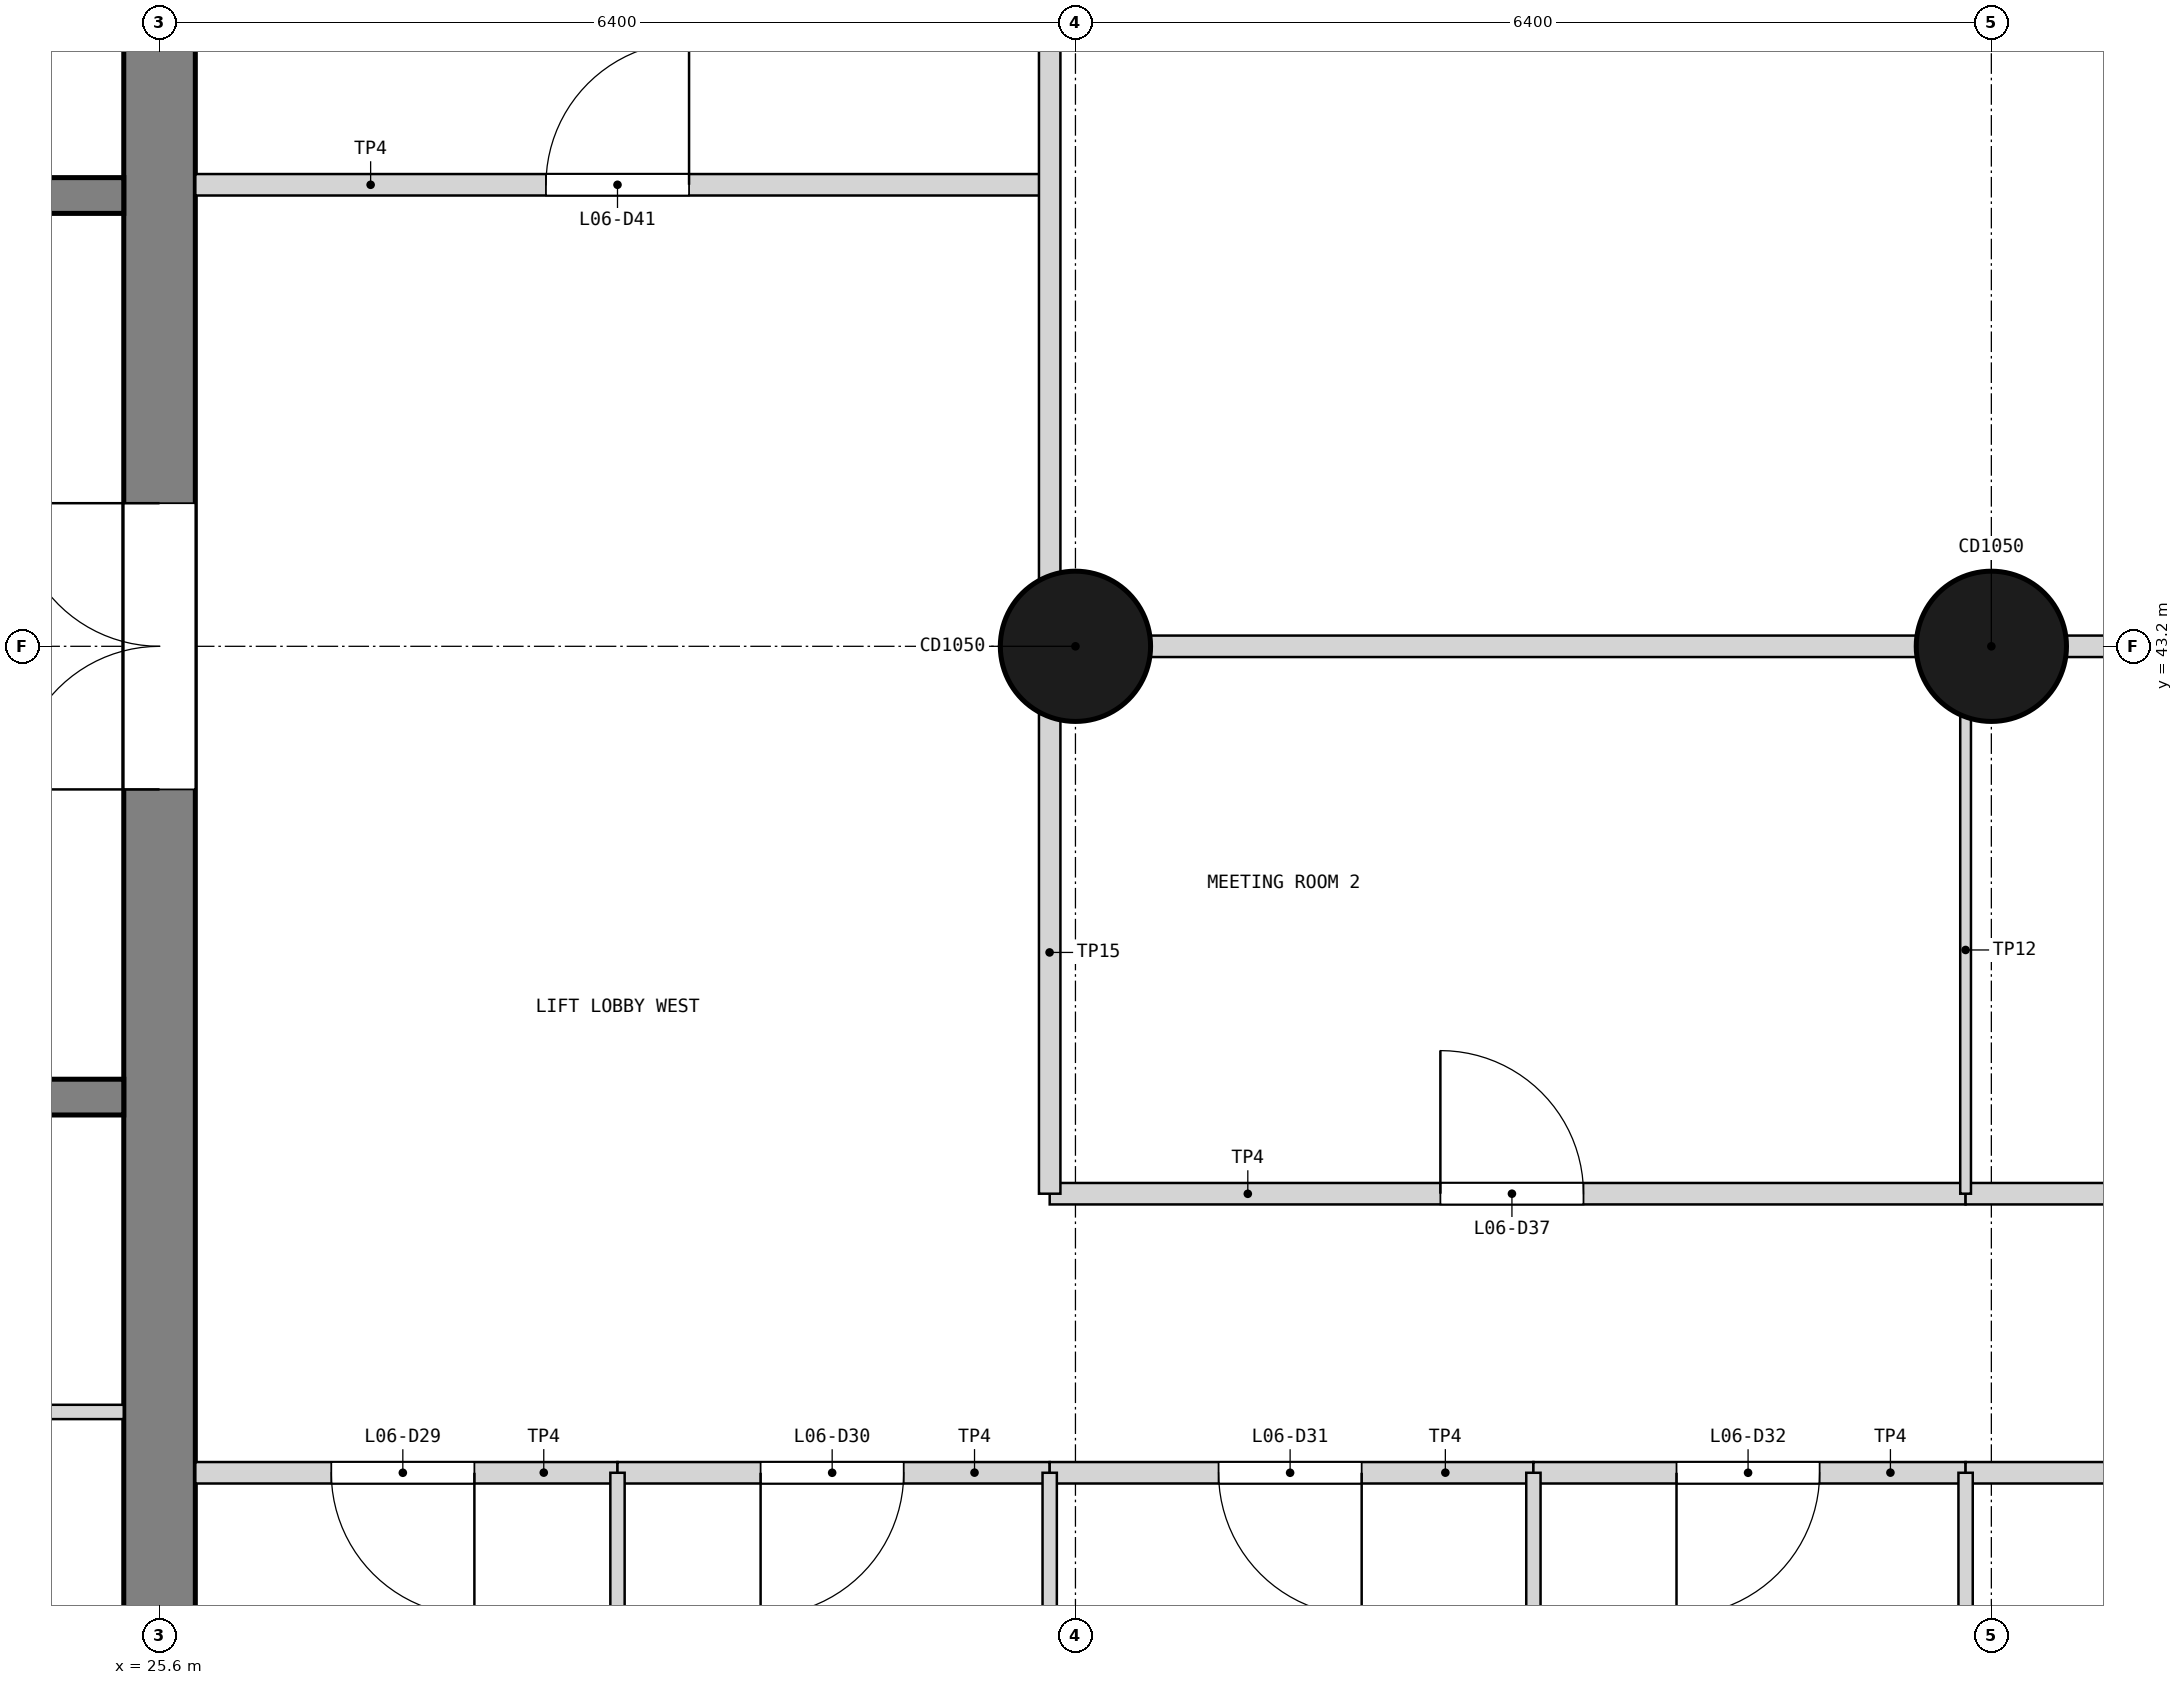
"""IFC4 building model, lengths in metres.
Left out: names, types, materials, properties, quantities, classifications, styles, units other than length and angle.
Written with IfcOpenShell. Run it as: python <this file> out.ifc"""

import sys

from ifc_helpers import new_model, si_unit, direction, frame, frame_2d, origin, origin_2d, place, context, subcontext, project, spatial, rectangle, circle, extrude, element, fill, save


model = new_model("IFC4")
c1 = context("Model", 3, precision=1e-05, world=origin(), true_north=direction((0.0, 1.0)))
c2 = subcontext(c1, "Body", "Model", "MODEL_VIEW")
j1 = project(units=[si_unit("LENGTHUNIT", "METRE"), si_unit("PLANEANGLEUNIT", "RADIAN")], contexts=[c1])
p1 = place(None, origin())
s1 = spatial("IfcSite", under=j1, at=p1, CompositionType="ELEMENT")
p2 = place(p1, origin())
s2 = spatial("IfcBuilding", under=s1, at=p2, CompositionType="ELEMENT")
p3 = place(p2, frame((0.0, 0.0, 24.9)))
s3 = spatial("IfcBuildingStorey", under=s2, at=p3, CompositionType="ELEMENT", Elevation=24.9)
p4 = place(p3, frame((25.6, 33.85, 0.0), z_axis=(0.0, 0.0, 1.0), x_axis=(0.0, 1.0, 0.0)))
e1 = element("IfcWall", 1, at=p4, inside=s3, PredefinedType="SHEAR", context=c2, shape_type="SweptSolid", body=[
    extrude(rectangle(XDim=18.7, YDim=0.5, at=frame_2d((9.35, 0.0))), origin(), (0.0, 0.0, 1.0), 3.9),
])
p5 = place(p4, frame((8.35, 0.0, 0.0)))
e2 = element("IfcOpeningElement", 2, at=p5, cuts=e1, PredefinedType="OPENING", context=c2, shape_type="SweptSolid", body=[
    extrude(rectangle(XDim=2.0, YDim=2.1, at=frame_2d((1.0, 1.05))), frame((0.0, 0.26, 0.0), z_axis=(0.0, -1.0, 0.0), x_axis=(1.0, 0.0, 0.0)), (0.0, 0.0, 1.0), 0.52),
])
for number, where, z_axis, x_axis in (
    (3, (32.0, 43.2, 0.0), (0.0, 0.0, 1.0), (1.0, 0.0, 0.0)),
    (4, (38.4, 43.2, 0.0), (0.0, 0.0, 1.0), (1.0, 0.0, 0.0)),
):
    element("IfcColumn", number, at=place(p3, frame(where, z_axis=z_axis, x_axis=x_axis)), inside=s3, PredefinedType="COLUMN", context=c2, shape_type="SweptSolid", body=[
        extrude(circle(Radius=0.525, at=origin_2d()), origin(), (0.0, 0.0, 1.0), 3.9),
    ])
for number, where, z_axis, x_axis in (
    (5, (19.875, 40.05, 0.0), (0.0, 0.0, 1.0), (1.0, 0.0, 0.0)),
    (6, (19.875, 46.35, 0.0), (0.0, 0.0, 1.0), (1.0, 0.0, 0.0)),
):
    element("IfcWall", number, at=place(p3, frame(where, z_axis=z_axis, x_axis=x_axis)), inside=s3, PredefinedType="SOLIDWALL", context=c2, shape_type="SweptSolid", body=[
        extrude(rectangle(XDim=5.475, YDim=0.25, at=frame_2d((2.738, 0.0))), origin(), (0.0, 0.0, 1.0), 3.6),
    ])
p6 = place(p3, frame((21.675, 37.85, 0.0), z_axis=(0.0, 0.0, 1.0), x_axis=(1.0, 0.0, 0.0)))
e7 = element("IfcWall", 7, at=p6, inside=s3, PredefinedType="PARTITIONING", context=c2, shape_type="SweptSolid", body=[
    extrude(rectangle(XDim=3.675, YDim=0.1, at=frame_2d((1.837, 0.0))), origin(), (0.0, 0.0, 1.0), 3.6),
])
p7 = place(p3, frame((25.85, 37.425, 0.0), z_axis=(0.0, 0.0, 1.0), x_axis=(1.0, 0.0, 0.0)))
e8 = element("IfcWall", 8, at=p7, inside=s3, PredefinedType="PARTITIONING", context=c2, shape_type="SweptSolid", body=[
    extrude(rectangle(XDim=2.95, YDim=0.15, at=frame_2d((1.475, 0.0))), origin(), (0.0, 0.0, 1.0), 3.68),
])
p8 = place(p7, frame((0.95, 0.0, 0.0)))
e9 = element("IfcOpeningElement", 9, at=p8, cuts=e8, PredefinedType="OPENING", context=c2, shape_type="SweptSolid", body=[
    extrude(rectangle(XDim=1.0, YDim=2.1, at=frame_2d((0.5, 1.05))), frame((0.0, 0.085, 0.0), z_axis=(0.0, -1.0, 0.0), x_axis=(1.0, 0.0, 0.0)), (0.0, 0.0, 1.0), 0.17),
])
p9 = place(p3, frame((28.8, 37.425, 0.0), z_axis=(0.0, 0.0, 1.0), x_axis=(1.0, 0.0, 0.0)))
e10 = element("IfcWall", 10, at=p9, inside=s3, PredefinedType="PARTITIONING", context=c2, shape_type="SweptSolid", body=[
    extrude(rectangle(XDim=3.02, YDim=0.15, at=frame_2d((1.51, 0.0))), origin(), (0.0, 0.0, 1.0), 3.68),
])
p10 = place(p9, frame((1.0, 0.0, 0.0)))
e11 = element("IfcOpeningElement", 11, at=p10, cuts=e10, PredefinedType="OPENING", context=c2, shape_type="SweptSolid", body=[
    extrude(rectangle(XDim=1.0, YDim=2.1, at=frame_2d((0.5, 1.05))), frame((0.0, 0.085, 0.0), z_axis=(0.0, -1.0, 0.0), x_axis=(1.0, 0.0, 0.0)), (0.0, 0.0, 1.0), 0.17),
])
p11 = place(p3, frame((31.82, 37.425, 0.0), z_axis=(0.0, 0.0, 1.0), x_axis=(1.0, 0.0, 0.0)))
e12 = element("IfcWall", 12, at=p11, inside=s3, PredefinedType="PARTITIONING", context=c2, shape_type="SweptSolid", body=[
    extrude(rectangle(XDim=3.38, YDim=0.15, at=frame_2d((1.69, 0.0))), origin(), (0.0, 0.0, 1.0), 3.68),
])
p12 = place(p11, frame((1.18, 0.0, 0.0)))
e13 = element("IfcOpeningElement", 13, at=p12, cuts=e12, PredefinedType="OPENING", context=c2, shape_type="SweptSolid", body=[
    extrude(rectangle(XDim=1.0, YDim=2.1, at=frame_2d((0.5, 1.05))), frame((0.0, 0.085, 0.0), z_axis=(0.0, -1.0, 0.0), x_axis=(1.0, 0.0, 0.0)), (0.0, 0.0, 1.0), 0.17),
])
p13 = place(p3, frame((35.2, 37.425, 0.0), z_axis=(0.0, 0.0, 1.0), x_axis=(1.0, 0.0, 0.0)))
e14 = element("IfcWall", 14, at=p13, inside=s3, PredefinedType="PARTITIONING", context=c2, shape_type="SweptSolid", body=[
    extrude(rectangle(XDim=3.02, YDim=0.15, at=frame_2d((1.51, 0.0))), origin(), (0.0, 0.0, 1.0), 3.68),
])
p14 = place(p13, frame((1.0, 0.0, 0.0)))
e15 = element("IfcOpeningElement", 15, at=p14, cuts=e14, PredefinedType="OPENING", context=c2, shape_type="SweptSolid", body=[
    extrude(rectangle(XDim=1.0, YDim=2.1, at=frame_2d((0.5, 1.05))), frame((0.0, 0.085, 0.0), z_axis=(0.0, -1.0, 0.0), x_axis=(1.0, 0.0, 0.0)), (0.0, 0.0, 1.0), 0.17),
])
p15 = place(p3, frame((38.22, 37.425, 0.0), z_axis=(0.0, 0.0, 1.0), x_axis=(1.0, 0.0, 0.0)))
e16 = element("IfcWall", 16, at=p15, inside=s3, PredefinedType="PARTITIONING", context=c2, shape_type="SweptSolid", body=[
    extrude(rectangle(XDim=13.16, YDim=0.15, at=frame_2d((6.58, 0.0))), origin(), (0.0, 0.0, 1.0), 3.68),
])
p16 = place(p15, frame((2.43, 0.0, 0.0)))
e17 = element("IfcOpeningElement", 17, at=p16, cuts=e16, PredefinedType="OPENING", context=c2, shape_type="SweptSolid", body=[
    extrude(rectangle(XDim=1.8, YDim=2.1, at=frame_2d((0.9, 1.05))), frame((0.0, 0.085, 0.0), z_axis=(0.0, -1.0, 0.0), x_axis=(1.0, 0.0, 0.0)), (0.0, 0.0, 1.0), 0.17),
])
p17 = place(p15, frame((8.93, 0.0, 0.0)))
e18 = element("IfcOpeningElement", 18, at=p17, cuts=e16, PredefinedType="OPENING", context=c2, shape_type="SweptSolid", body=[
    extrude(rectangle(XDim=1.8, YDim=2.1, at=frame_2d((0.9, 1.05))), frame((0.0, 0.085, 0.0), z_axis=(0.0, -1.0, 0.0), x_axis=(1.0, 0.0, 0.0)), (0.0, 0.0, 1.0), 0.17),
])
p18 = place(p3, frame((28.8, 31.3, 0.0), z_axis=(0.0, 0.0, 1.0), x_axis=(0.0, 1.0, 0.0)))
e19 = element("IfcWall", 19, at=p18, inside=s3, PredefinedType="PARTITIONING", context=c2, shape_type="SweptSolid", body=[
    extrude(rectangle(XDim=6.125, YDim=0.1, at=frame_2d((3.062, 0.0))), origin(), (0.0, 0.0, 1.0), 3.08),
])
p19 = place(p3, frame((31.82, 34.205, 0.0), z_axis=(0.0, 0.0, 1.0), x_axis=(0.0, 1.0, 0.0)))
e20 = element("IfcWall", 20, at=p19, inside=s3, PredefinedType="PARTITIONING", context=c2, shape_type="SweptSolid", body=[
    extrude(rectangle(XDim=3.22, YDim=0.1, at=frame_2d((1.61, 0.0))), origin(), (0.0, 0.0, 1.0), 2.78),
])
p20 = place(p3, frame((35.2, 31.3, 0.0), z_axis=(0.0, 0.0, 1.0), x_axis=(0.0, 1.0, 0.0)))
e21 = element("IfcWall", 21, at=p20, inside=s3, PredefinedType="PARTITIONING", context=c2, shape_type="SweptSolid", body=[
    extrude(rectangle(XDim=6.125, YDim=0.1, at=frame_2d((3.062, 0.0))), origin(), (0.0, 0.0, 1.0), 3.08),
])
p21 = place(p3, frame((38.22, 34.205, 0.0), z_axis=(0.0, 0.0, 1.0), x_axis=(0.0, 1.0, 0.0)))
e22 = element("IfcWall", 22, at=p21, inside=s3, PredefinedType="PARTITIONING", context=c2, shape_type="SweptSolid", body=[
    extrude(rectangle(XDim=3.22, YDim=0.1, at=frame_2d((1.61, 0.0))), origin(), (0.0, 0.0, 1.0), 2.78),
])
p22 = place(p3, frame((31.82, 39.375, 0.0), z_axis=(0.0, 0.0, 1.0), x_axis=(1.0, 0.0, 0.0)))
e23 = element("IfcWall", 23, at=p22, inside=s3, PredefinedType="PARTITIONING", context=c2, shape_type="SweptSolid", body=[
    extrude(rectangle(XDim=6.4, YDim=0.15, at=frame_2d((3.2, 0.0))), origin(), (0.0, 0.0, 1.0), 3.68),
])
p23 = place(p22, frame((2.73, 0.0, 0.0)))
e24 = element("IfcOpeningElement", 24, at=p23, cuts=e23, PredefinedType="OPENING", context=c2, shape_type="SweptSolid", body=[
    extrude(rectangle(XDim=1.0, YDim=2.1, at=frame_2d((0.5, 1.05))), frame((0.0, 0.085, 0.0), z_axis=(0.0, -1.0, 0.0), x_axis=(1.0, 0.0, 0.0)), (0.0, 0.0, 1.0), 0.17),
])
p24 = place(p3, frame((38.22, 39.375, 0.0), z_axis=(0.0, 0.0, 1.0), x_axis=(1.0, 0.0, 0.0)))
e25 = element("IfcWall", 25, at=p24, inside=s3, PredefinedType="PARTITIONING", context=c2, shape_type="SweptSolid", body=[
    extrude(rectangle(XDim=6.4, YDim=0.15, at=frame_2d((3.2, 0.0))), origin(), (0.0, 0.0, 1.0), 3.68),
])
p25 = place(p24, frame((2.68, 0.0, 0.0)))
e26 = element("IfcOpeningElement", 26, at=p25, cuts=e25, PredefinedType="OPENING", context=c2, shape_type="SweptSolid", body=[
    extrude(rectangle(XDim=1.0, YDim=2.1, at=frame_2d((0.5, 1.05))), frame((0.0, 0.085, 0.0), z_axis=(0.0, -1.0, 0.0), x_axis=(1.0, 0.0, 0.0)), (0.0, 0.0, 1.0), 0.17),
])
p26 = place(p3, frame((38.22, 39.375, 0.0), z_axis=(0.0, 0.0, 1.0), x_axis=(0.0, 1.0, 0.0)))
e27 = element("IfcWall", 27, at=p26, inside=s3, PredefinedType="PARTITIONING", context=c2, shape_type="SweptSolid", body=[
    extrude(rectangle(XDim=3.352, YDim=0.075, at=frame_2d((1.676, 0.0))), origin(), (0.0, 0.0, 1.0), 2.78),
])
p27 = place(p3, frame((31.82, 43.2, 0.0), z_axis=(0.0, 0.0, 1.0), x_axis=(1.0, 0.0, 0.0)))
e28 = element("IfcWall", 28, at=p27, inside=s3, PredefinedType="PARTITIONING", context=c2, shape_type="SweptSolid", body=[
    extrude(rectangle(XDim=25.96, YDim=0.15, at=frame_2d((12.98, 0.0))), origin(), (0.0, 0.0, 1.0), 2.88),
])
p28 = place(p27, frame((13.825, 0.0, 0.0)))
e29 = element("IfcOpeningElement", 29, at=p28, cuts=e28, PredefinedType="OPENING", context=c2, shape_type="SweptSolid", body=[
    extrude(rectangle(XDim=1.8, YDim=2.1, at=frame_2d((0.9, 1.05))), frame((0.0, 0.085, 0.0), z_axis=(0.0, -1.0, 0.0), x_axis=(1.0, 0.0, 0.0)), (0.0, 0.0, 1.0), 0.17),
])
p29 = place(p27, frame((16.725, 0.0, 0.0)))
e30 = element("IfcOpeningElement", 30, at=p29, cuts=e28, PredefinedType="OPENING", context=c2, shape_type="SweptSolid", body=[
    extrude(rectangle(XDim=1.8, YDim=2.1, at=frame_2d((0.9, 1.05))), frame((0.0, 0.085, 0.0), z_axis=(0.0, -1.0, 0.0), x_axis=(1.0, 0.0, 0.0)), (0.0, 0.0, 1.0), 0.17),
])
p30 = place(p3, frame((25.85, 46.425, 0.0), z_axis=(0.0, 0.0, 1.0), x_axis=(1.0, 0.0, 0.0)))
e31 = element("IfcWall", 31, at=p30, inside=s3, PredefinedType="PARTITIONING", context=c2, shape_type="SweptSolid", body=[
    extrude(rectangle(XDim=5.97, YDim=0.15, at=frame_2d((2.985, 0.0))), origin(), (0.0, 0.0, 1.0), 3.68),
])
p31 = place(p30, frame((2.45, 0.0, 0.0)))
e32 = element("IfcOpeningElement", 32, at=p31, cuts=e31, PredefinedType="OPENING", context=c2, shape_type="SweptSolid", body=[
    extrude(rectangle(XDim=1.0, YDim=2.1, at=frame_2d((0.5, 1.05))), frame((0.0, 0.085, 0.0), z_axis=(0.0, -1.0, 0.0), x_axis=(1.0, 0.0, 0.0)), (0.0, 0.0, 1.0), 0.17),
])
p32 = place(p3, frame((31.82, 39.375, 0.0), z_axis=(0.0, 0.0, 1.0), x_axis=(0.0, 1.0, 0.0)))
e33 = element("IfcWall", 33, at=p32, inside=s3, PredefinedType="PARTITIONING", context=c2, shape_type="SweptSolid", body=[
    extrude(rectangle(XDim=3.352, YDim=0.15, at=frame_2d((1.676, 0.0))), origin(), (0.0, 0.0, 1.0), 2.78),
])
p33 = place(p3, frame((31.82, 43.673, 0.0), z_axis=(0.0, 0.0, 1.0), x_axis=(0.0, 1.0, 0.0)))
e34 = element("IfcWall", 34, at=p33, inside=s3, PredefinedType="PARTITIONING", context=c2, shape_type="SweptSolid", body=[
    extrude(rectangle(XDim=8.522, YDim=0.15, at=frame_2d((4.261, 0.0))), origin(), (0.0, 0.0, 1.0), 2.78),
])
p34 = place(p5, origin())
e35 = element("IfcDoor", 35, at=p34, inside=s3, OperationType="DOUBLE_DOOR_SINGLE_SWING", PredefinedType="DOOR", context=c2, shape_type="SweptSolid", body=[
    extrude(rectangle(XDim=2.0, YDim=2.1, at=frame_2d((1.0, 1.05))), frame((0.0, 0.025, 0.0), z_axis=(0.0, -1.0, 0.0), x_axis=(1.0, 0.0, 0.0)), (0.0, 0.0, 1.0), 0.05),
])
fill(e2, e35)
p35 = place(p8, frame((1.0, 0.0, 0.0), z_axis=(0.0, 0.0, 1.0), x_axis=(-1.0, 0.0, 0.0)))
e36 = element("IfcDoor", 36, at=p35, inside=s3, OperationType="SINGLE_SWING_LEFT", PredefinedType="DOOR", context=c2, shape_type="SweptSolid", body=[
    extrude(rectangle(XDim=1.0, YDim=2.1, at=frame_2d((0.5, 1.05))), frame((0.0, 0.025, 0.0), z_axis=(0.0, -1.0, 0.0), x_axis=(1.0, 0.0, 0.0)), (0.0, 0.0, 1.0), 0.05),
])
fill(e9, e36)
p36 = place(p10, frame((1.0, 0.0, 0.0), z_axis=(0.0, 0.0, 1.0), x_axis=(-1.0, 0.0, 0.0)))
e37 = element("IfcDoor", 37, at=p36, inside=s3, OperationType="SINGLE_SWING_RIGHT", PredefinedType="DOOR", context=c2, shape_type="SweptSolid", body=[
    extrude(rectangle(XDim=1.0, YDim=2.1, at=frame_2d((0.5, 1.05))), frame((0.0, 0.025, 0.0), z_axis=(0.0, -1.0, 0.0), x_axis=(1.0, 0.0, 0.0)), (0.0, 0.0, 1.0), 0.05),
])
fill(e11, e37)
p37 = place(p12, frame((1.0, 0.0, 0.0), z_axis=(0.0, 0.0, 1.0), x_axis=(-1.0, 0.0, 0.0)))
e38 = element("IfcDoor", 38, at=p37, inside=s3, OperationType="SINGLE_SWING_LEFT", PredefinedType="DOOR", context=c2, shape_type="SweptSolid", body=[
    extrude(rectangle(XDim=1.0, YDim=2.1, at=frame_2d((0.5, 1.05))), frame((0.0, 0.025, 0.0), z_axis=(0.0, -1.0, 0.0), x_axis=(1.0, 0.0, 0.0)), (0.0, 0.0, 1.0), 0.05),
])
fill(e13, e38)
p38 = place(p14, frame((1.0, 0.0, 0.0), z_axis=(0.0, 0.0, 1.0), x_axis=(-1.0, 0.0, 0.0)))
e39 = element("IfcDoor", 39, at=p38, inside=s3, OperationType="SINGLE_SWING_RIGHT", PredefinedType="DOOR", context=c2, shape_type="SweptSolid", body=[
    extrude(rectangle(XDim=1.0, YDim=2.1, at=frame_2d((0.5, 1.05))), frame((0.0, 0.025, 0.0), z_axis=(0.0, -1.0, 0.0), x_axis=(1.0, 0.0, 0.0)), (0.0, 0.0, 1.0), 0.05),
])
fill(e15, e39)
p39 = place(p23, origin())
e40 = element("IfcDoor", 40, at=p39, inside=s3, OperationType="SINGLE_SWING_LEFT", PredefinedType="DOOR", context=c2, shape_type="SweptSolid", body=[
    extrude(rectangle(XDim=1.0, YDim=2.1, at=frame_2d((0.5, 1.05))), frame((0.0, 0.025, 0.0), z_axis=(0.0, -1.0, 0.0), x_axis=(1.0, 0.0, 0.0)), (0.0, 0.0, 1.0), 0.05),
])
fill(e24, e40)
p40 = place(p31, origin())
e41 = element("IfcDoor", 41, at=p40, inside=s3, OperationType="SINGLE_SWING_RIGHT", PredefinedType="DOOR", context=c2, shape_type="SweptSolid", body=[
    extrude(rectangle(XDim=1.0, YDim=2.1, at=frame_2d((0.5, 1.05))), frame((0.0, 0.025, 0.0), z_axis=(0.0, -1.0, 0.0), x_axis=(1.0, 0.0, 0.0)), (0.0, 0.0, 1.0), 0.05),
])
fill(e32, e41)
save(model, sys.argv[1])
